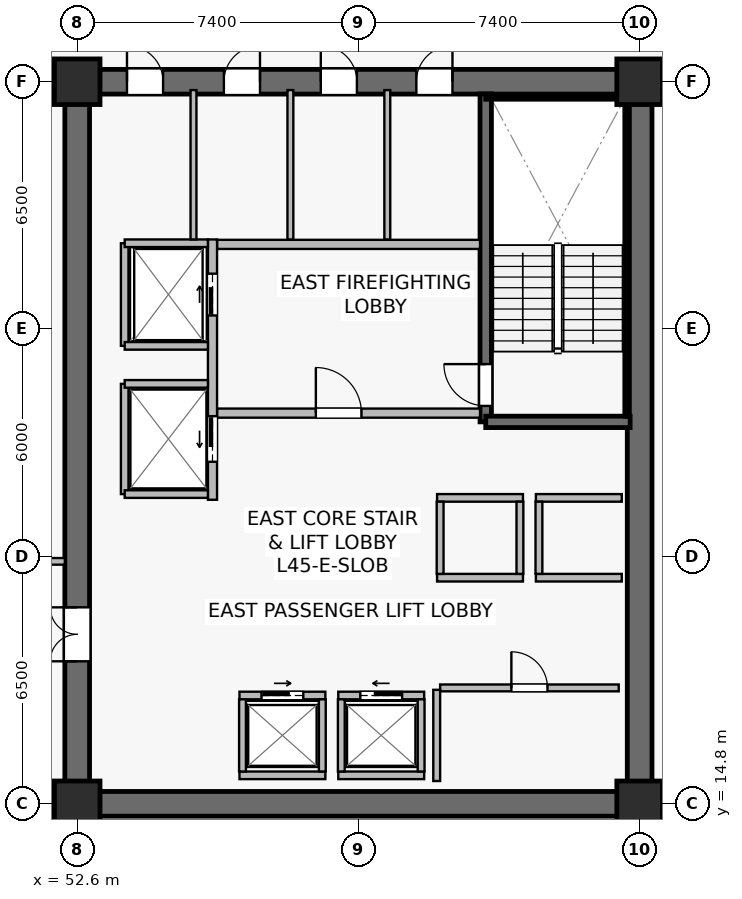
"""IFC4 building model, lengths in metres.
Left out: names, types, materials, properties, quantities, classifications, styles, units other than length and angle.
Written with IfcOpenShell. Run it as: python <this file> out.ifc"""

import sys

from ifc_helpers import new_model, si_unit, direction, frame, frame_2d, origin, origin_2d, place, context, subcontext, project, spatial, rectangle, extrude, source, transform, mapped, element, fill, save


model = new_model("IFC4")
c1 = context("Model", 3, precision=1e-05, world=origin(), true_north=direction((0.0, 1.0)))
c2 = subcontext(c1, "Body", "Model", "MODEL_VIEW")
j1 = project(units=[si_unit("LENGTHUNIT", "METRE"), si_unit("PLANEANGLEUNIT", "RADIAN")], contexts=[c1])
p1 = place(None, origin())
s1 = spatial("IfcSite", under=j1, at=p1, CompositionType="ELEMENT")
p2 = place(p1, origin())
s2 = spatial("IfcBuilding", under=s1, at=p2, CompositionType="ELEMENT")
p3 = place(p2, frame((0.0, 0.0, 187.1)))
s3 = spatial("IfcBuildingStorey", under=s2, at=p3, CompositionType="ELEMENT", Elevation=187.1)
p4 = place(p3, frame((52.275, 14.8, 0.0), z_axis=(0.0, 0.0, 1.0), x_axis=(1.0, 0.0, 0.0)))
e1 = element("IfcWall", 1, at=p4, inside=s3, PredefinedType="SHEAR", context=c2, shape_type="SweptSolid", body=[
    extrude(rectangle(XDim=15.45, YDim=0.65, at=frame_2d((7.725, 0.0))), origin(), (0.0, 0.0, 1.0), 3.79),
])
p5 = place(p3, frame((52.275, 33.8, 0.0), z_axis=(0.0, 0.0, 1.0), x_axis=(1.0, 0.0, 0.0)))
e2 = element("IfcWall", 2, at=p5, inside=s3, PredefinedType="SHEAR", context=c2, shape_type="SweptSolid", body=[
    extrude(rectangle(XDim=15.45, YDim=0.65, at=frame_2d((7.725, 0.0))), origin(), (0.0, 0.0, 1.0), 3.79),
])
p6 = place(p5, frame((9.25, 0.0, 0.0)))
e3 = element("IfcOpeningElement", 3, at=p6, cuts=e2, PredefinedType="OPENING", context=c2, shape_type="SweptSolid", body=[
    extrude(rectangle(XDim=0.95, YDim=2.15, at=frame_2d((0.475, 1.075))), frame((0.0, 0.335, 0.0), z_axis=(0.0, -1.0, 0.0), x_axis=(1.0, 0.0, 0.0)), (0.0, 0.0, 1.0), 0.67),
])
p7 = place(p5, frame((6.735, 0.0, 0.0)))
e4 = element("IfcOpeningElement", 4, at=p7, cuts=e2, PredefinedType="OPENING", context=c2, shape_type="SweptSolid", body=[
    extrude(rectangle(XDim=0.95, YDim=2.15, at=frame_2d((0.475, 1.075))), frame((0.0, 0.335, 0.0), z_axis=(0.0, -1.0, 0.0), x_axis=(1.0, 0.0, 0.0)), (0.0, 0.0, 1.0), 0.67),
])
p8 = place(p5, frame((4.185, 0.0, 0.0)))
e5 = element("IfcOpeningElement", 5, at=p8, cuts=e2, PredefinedType="OPENING", context=c2, shape_type="SweptSolid", body=[
    extrude(rectangle(XDim=0.95, YDim=2.15, at=frame_2d((0.475, 1.075))), frame((0.0, 0.335, 0.0), z_axis=(0.0, -1.0, 0.0), x_axis=(1.0, 0.0, 0.0)), (0.0, 0.0, 1.0), 0.67),
])
p9 = place(p5, frame((1.635, 0.0, 0.0)))
e6 = element("IfcOpeningElement", 6, at=p9, cuts=e2, PredefinedType="OPENING", context=c2, shape_type="SweptSolid", body=[
    extrude(rectangle(XDim=0.95, YDim=2.15, at=frame_2d((0.475, 1.075))), frame((0.0, 0.335, 0.0), z_axis=(0.0, -1.0, 0.0), x_axis=(1.0, 0.0, 0.0)), (0.0, 0.0, 1.0), 0.67),
])
p10 = place(p3, frame((52.6, 15.125, 0.0), z_axis=(0.0, 0.0, 1.0), x_axis=(0.0, 1.0, 0.0)))
e7 = element("IfcWall", 7, at=p10, inside=s3, PredefinedType="SHEAR", context=c2, shape_type="SweptSolid", body=[
    extrude(rectangle(XDim=18.35, YDim=0.65, at=frame_2d((9.175, 0.0))), origin(), (0.0, 0.0, 1.0), 3.79),
])
p11 = place(p10, frame((3.425, 0.0, 0.0)))
e8 = element("IfcOpeningElement", 8, at=p11, cuts=e7, PredefinedType="OPENING", context=c2, shape_type="SweptSolid", body=[
    extrude(rectangle(XDim=1.42, YDim=2.2, at=frame_2d((0.71, 1.1))), frame((0.0, 0.335, 0.0), z_axis=(0.0, -1.0, 0.0), x_axis=(1.0, 0.0, 0.0)), (0.0, 0.0, 1.0), 0.67),
])
p12 = place(p3, frame((67.4, 15.125, 0.0), z_axis=(0.0, 0.0, 1.0), x_axis=(0.0, 1.0, 0.0)))
e9 = element("IfcWall", 9, at=p12, inside=s3, PredefinedType="SHEAR", context=c2, shape_type="SweptSolid", body=[
    extrude(rectangle(XDim=18.35, YDim=0.65, at=frame_2d((9.175, 0.0))), origin(), (0.0, 0.0, 1.0), 3.79),
])
p13 = place(p3, frame((63.35, 24.85, 0.0), z_axis=(0.0, 0.0, 1.0), x_axis=(0.0, 1.0, 0.0)))
e10 = element("IfcWall", 10, at=p13, inside=s3, PredefinedType="SHEAR", context=c2, shape_type="SweptSolid", body=[
    extrude(rectangle(XDim=8.63, YDim=0.3, at=frame_2d((4.315, 0.0))), origin(), (0.0, 0.0, 1.0), 3.79),
])
p14 = place(p13, frame((0.42, 0.0, 0.0)))
e11 = element("IfcOpeningElement", 11, at=p14, cuts=e10, PredefinedType="OPENING", context=c2, shape_type="SweptSolid", body=[
    extrude(rectangle(XDim=1.1, YDim=2.15, at=frame_2d((0.55, 1.075))), frame((0.0, 0.16, 0.0), z_axis=(0.0, -1.0, 0.0), x_axis=(1.0, 0.0, 0.0)), (0.0, 0.0, 1.0), 0.32),
])
p15 = place(p3, frame((63.35, 24.85, 0.0), z_axis=(0.0, 0.0, 1.0), x_axis=(1.0, 0.0, 0.0)))
e12 = element("IfcWall", 12, at=p15, inside=s3, PredefinedType="SHEAR", context=c2, shape_type="SweptSolid", body=[
    extrude(rectangle(XDim=3.8, YDim=0.3, at=frame_2d((1.9, 0.0))), origin(), (0.0, 0.0, 1.0), 3.79),
])
p16 = place(p3, frame((63.35, 33.4, 0.0), z_axis=(0.0, 0.0, 1.0), x_axis=(1.0, 0.0, 0.0)))
e13 = element("IfcWall", 13, at=p16, inside=s3, PredefinedType="SOLIDWALL", context=c2, shape_type="SweptSolid", body=[
    extrude(rectangle(XDim=3.72, YDim=0.12, at=frame_2d((1.86, 0.0))), origin(), (0.0, 0.0, 1.0), 3.79),
])
p17 = place(p3, frame((67.07, 25.0, 0.0), z_axis=(0.0, 0.0, 1.0), x_axis=(0.0, 1.0, 0.0)))
e14 = element("IfcWall", 14, at=p17, inside=s3, PredefinedType="SOLIDWALL", context=c2, shape_type="SweptSolid", body=[
    extrude(rectangle(XDim=8.32, YDim=0.12, at=frame_2d((4.16, 0.0))), origin(), (0.0, 0.0, 1.0), 3.79),
])
m1 = source(origin(), c2, "Body", "SweptSolid", [
    extrude(rectangle(XDim=1.2, YDim=1.2, at=origin_2d()), origin(), (0.0, 0.0, 1.0), 4.1),
])
for number, where, z_axis, x_axis in (
    (15, (52.6, 14.8, 0.0), (0.0, 0.0, 1.0), (1.0, 0.0, 0.0)),
    (16, (67.4, 14.8, 0.0), (0.0, 0.0, 1.0), (1.0, 0.0, 0.0)),
    (17, (52.6, 33.8, 0.0), (0.0, 0.0, 1.0), (1.0, 0.0, 0.0)),
    (18, (67.4, 33.8, 0.0), (0.0, 0.0, 1.0), (1.0, 0.0, 0.0)),
):
    element("IfcColumn", number, at=place(p3, frame(where, z_axis=z_axis, x_axis=x_axis)), inside=s3, PredefinedType="COLUMN", context=c2, shape_type="MappedRepresentation", body=[
        mapped(m1, transform((0.0, 0.0, 0.0), scale=1.0)),
    ])
p18 = place(p3, frame((56.28, 25.08, 0.0), z_axis=(0.0, 0.0, 1.0), x_axis=(1.0, 0.0, 0.0)))
e19 = element("IfcWall", 19, at=p18, inside=s3, PredefinedType="SOLIDWALL", context=c2, shape_type="SweptSolid", body=[
    extrude(rectangle(XDim=6.92, YDim=0.24, at=frame_2d((3.46, 0.0))), origin(), (0.0, 0.0, 1.0), 3.187),
])
p19 = place(p18, frame((2.6, 0.0, 0.0)))
e20 = element("IfcOpeningElement", 20, at=p19, cuts=e19, PredefinedType="OPENING", context=c2, shape_type="SweptSolid", body=[
    extrude(rectangle(XDim=1.2, YDim=2.16, at=frame_2d((0.6, 1.08))), frame((0.0, 0.13, 0.0), z_axis=(0.0, -1.0, 0.0), x_axis=(1.0, 0.0, 0.0)), (0.0, 0.0, 1.0), 0.26),
])
p20 = place(p3, frame((56.28, 29.52, 0.0), z_axis=(0.0, 0.0, 1.0), x_axis=(1.0, 0.0, 0.0)))
e21 = element("IfcWall", 21, at=p20, inside=s3, PredefinedType="SOLIDWALL", context=c2, shape_type="SweptSolid", body=[
    extrude(rectangle(XDim=6.92, YDim=0.24, at=frame_2d((3.46, 0.0))), origin(), (0.0, 0.0, 1.0), 3.187),
])
p21 = place(p3, frame((56.16, 22.8, 0.0), z_axis=(0.0, 0.0, 1.0), x_axis=(0.0, 1.0, 0.0)))
e22 = element("IfcWall", 22, at=p21, inside=s3, PredefinedType="SOLIDWALL", context=c2, shape_type="SweptSolid", body=[
    extrude(rectangle(XDim=6.85, YDim=0.24, at=frame_2d((3.425, 0.0))), origin(), (0.0, 0.0, 1.0), 2.925),
])
p22 = place(p21, frame((4.85, 0.0, 0.0)))
e23 = element("IfcOpeningElement", 23, at=p22, cuts=e22, PredefinedType="OPENING", context=c2, shape_type="SweptSolid", body=[
    extrude(rectangle(XDim=1.1, YDim=2.22, at=frame_2d((0.55, 1.11))), frame((0.0, 0.13, 0.0), z_axis=(0.0, -1.0, 0.0), x_axis=(1.0, 0.0, 0.0)), (0.0, 0.0, 1.0), 0.26),
])
p23 = place(p21, frame((1.0, 0.0, 0.0)))
e24 = element("IfcOpeningElement", 24, at=p23, cuts=e22, PredefinedType="OPENING", context=c2, shape_type="SweptSolid", body=[
    extrude(rectangle(XDim=1.2, YDim=2.22, at=frame_2d((0.6, 1.11))), frame((0.0, 0.13, 0.0), z_axis=(0.0, -1.0, 0.0), x_axis=(1.0, 0.0, 0.0)), (0.0, 0.0, 1.0), 0.26),
])
p24 = place(p3, frame((59.47, 17.65, 0.0), z_axis=(0.0, 0.0, 1.0), x_axis=(1.0, 0.0, 0.0)))
e25 = element("IfcWall", 25, at=p24, inside=s3, PredefinedType="SOLIDWALL", context=c2, shape_type="SweptSolid", body=[
    extrude(rectangle(XDim=2.26, YDim=0.2, at=frame_2d((1.13, 0.0))), origin(), (0.0, 0.0, 1.0), 3.187),
])
p25 = place(p24, frame((0.58, 0.0, 0.0)))
e26 = element("IfcOpeningElement", 26, at=p25, cuts=e25, PredefinedType="OPENING", context=c2, shape_type="SweptSolid", body=[
    extrude(rectangle(XDim=1.1, YDim=2.22, at=frame_2d((0.55, 1.11))), frame((0.0, 0.11, 0.0), z_axis=(0.0, -1.0, 0.0), x_axis=(1.0, 0.0, 0.0)), (0.0, 0.0, 1.0), 0.22),
])
p26 = place(p3, frame((59.47, 15.55, 0.0), z_axis=(0.0, 0.0, 1.0), x_axis=(1.0, 0.0, 0.0)))
e27 = element("IfcWall", 27, at=p26, inside=s3, PredefinedType="SOLIDWALL", context=c2, shape_type="SweptSolid", body=[
    extrude(rectangle(XDim=2.26, YDim=0.2, at=frame_2d((1.13, 0.0))), origin(), (0.0, 0.0, 1.0), 3.187),
])
for number, where, z_axis, x_axis in (
    (28, (59.55, 15.65, 0.0), (0.0, 0.0, 1.0), (0.0, 1.0, 0.0)),
    (29, (61.65, 15.65, 0.0), (0.0, 0.0, 1.0), (0.0, 1.0, 0.0)),
):
    element("IfcWall", number, at=place(p3, frame(where, z_axis=z_axis, x_axis=x_axis)), inside=s3, PredefinedType="SOLIDWALL", context=c2, shape_type="SweptSolid", body=[
        extrude(rectangle(XDim=1.9, YDim=0.18, at=frame_2d((0.95, 0.0))), origin(), (0.0, 0.0, 1.0), 3.79),
    ])
p27 = place(p3, frame((56.87, 17.65, 0.0), z_axis=(0.0, 0.0, 1.0), x_axis=(1.0, 0.0, 0.0)))
e30 = element("IfcWall", 30, at=p27, inside=s3, PredefinedType="SOLIDWALL", context=c2, shape_type="SweptSolid", body=[
    extrude(rectangle(XDim=2.26, YDim=0.2, at=frame_2d((1.13, 0.0))), origin(), (0.0, 0.0, 1.0), 3.79),
])
p28 = place(p27, frame((0.58, 0.0, 0.0)))
e31 = element("IfcOpeningElement", 31, at=p28, cuts=e30, PredefinedType="OPENING", context=c2, shape_type="SweptSolid", body=[
    extrude(rectangle(XDim=1.1, YDim=2.22, at=frame_2d((0.55, 1.11))), frame((0.0, 0.11, 0.0), z_axis=(0.0, -1.0, 0.0), x_axis=(1.0, 0.0, 0.0)), (0.0, 0.0, 1.0), 0.22),
])
p29 = place(p3, frame((56.87, 15.55, 0.0), z_axis=(0.0, 0.0, 1.0), x_axis=(1.0, 0.0, 0.0)))
e32 = element("IfcWall", 32, at=p29, inside=s3, PredefinedType="SOLIDWALL", context=c2, shape_type="SweptSolid", body=[
    extrude(rectangle(XDim=2.26, YDim=0.2, at=frame_2d((1.13, 0.0))), origin(), (0.0, 0.0, 1.0), 3.79),
])
for number, where, z_axis, x_axis in (
    (33, (56.95, 15.65, 0.0), (0.0, 0.0, 1.0), (0.0, 1.0, 0.0)),
    (34, (59.05, 15.65, 0.0), (0.0, 0.0, 1.0), (0.0, 1.0, 0.0)),
):
    element("IfcWall", number, at=place(p3, frame(where, z_axis=z_axis, x_axis=x_axis)), inside=s3, PredefinedType="SOLIDWALL", context=c2, shape_type="SweptSolid", body=[
        extrude(rectangle(XDim=1.9, YDim=0.18, at=frame_2d((0.95, 0.0))), origin(), (0.0, 0.0, 1.0), 3.79),
    ])
for number, where, z_axis, x_axis in (
    (35, (64.67, 20.75, 0.0), (0.0, 0.0, 1.0), (1.0, 0.0, 0.0)),
    (36, (64.67, 22.85, 0.0), (0.0, 0.0, 1.0), (1.0, 0.0, 0.0)),
):
    element("IfcWall", number, at=place(p3, frame(where, z_axis=z_axis, x_axis=x_axis)), inside=s3, PredefinedType="SOLIDWALL", context=c2, shape_type="SweptSolid", body=[
        extrude(rectangle(XDim=2.26, YDim=0.2, at=frame_2d((1.13, 0.0))), origin(), (0.0, 0.0, 1.0), 3.79),
    ])
p30 = place(p3, frame((64.75, 20.85, 0.0), z_axis=(0.0, 0.0, 1.0), x_axis=(0.0, 1.0, 0.0)))
e37 = element("IfcWall", 37, at=p30, inside=s3, PredefinedType="SOLIDWALL", context=c2, shape_type="SweptSolid", body=[
    extrude(rectangle(XDim=1.9, YDim=0.18, at=frame_2d((0.95, 0.0))), origin(), (0.0, 0.0, 1.0), 3.79),
])
for number, where, z_axis, x_axis in (
    (38, (62.07, 20.75, 0.0), (0.0, 0.0, 1.0), (1.0, 0.0, 0.0)),
    (39, (62.07, 22.85, 0.0), (0.0, 0.0, 1.0), (1.0, 0.0, 0.0)),
):
    element("IfcWall", number, at=place(p3, frame(where, z_axis=z_axis, x_axis=x_axis)), inside=s3, PredefinedType="SOLIDWALL", context=c2, shape_type="SweptSolid", body=[
        extrude(rectangle(XDim=2.26, YDim=0.2, at=frame_2d((1.13, 0.0))), origin(), (0.0, 0.0, 1.0), 3.79),
    ])
for number, where, z_axis, x_axis in (
    (40, (62.15, 20.85, 0.0), (0.0, 0.0, 1.0), (0.0, 1.0, 0.0)),
    (41, (64.25, 20.85, 0.0), (0.0, 0.0, 1.0), (0.0, 1.0, 0.0)),
):
    element("IfcWall", number, at=place(p3, frame(where, z_axis=z_axis, x_axis=x_axis)), inside=s3, PredefinedType="SOLIDWALL", context=c2, shape_type="SweptSolid", body=[
        extrude(rectangle(XDim=1.9, YDim=0.18, at=frame_2d((0.95, 0.0))), origin(), (0.0, 0.0, 1.0), 3.79),
    ])
p31 = place(p3, frame((53.85, 26.85, 0.0), z_axis=(0.0, 0.0, 1.0), x_axis=(0.0, 1.0, 0.0)))
e42 = element("IfcWall", 42, at=p31, inside=s3, PredefinedType="SOLIDWALL", context=c2, shape_type="SweptSolid", body=[
    extrude(rectangle(XDim=2.7, YDim=0.2, at=frame_2d((1.35, 0.0))), origin(), (0.0, 0.0, 1.0), 3.79),
])
p32 = place(p3, frame((53.85, 29.55, 0.0), z_axis=(0.0, 0.0, 1.0), x_axis=(1.0, 0.0, 0.0)))
e43 = element("IfcWall", 43, at=p32, inside=s3, PredefinedType="SOLIDWALL", context=c2, shape_type="SweptSolid", body=[
    extrude(rectangle(XDim=2.19, YDim=0.2, at=frame_2d((1.095, 0.0))), origin(), (0.0, 0.0, 1.0), 3.79),
])
p33 = place(p3, frame((53.85, 26.85, 0.0), z_axis=(0.0, 0.0, 1.0), x_axis=(1.0, 0.0, 0.0)))
e44 = element("IfcWall", 44, at=p33, inside=s3, PredefinedType="SOLIDWALL", context=c2, shape_type="SweptSolid", body=[
    extrude(rectangle(XDim=2.19, YDim=0.2, at=frame_2d((1.095, 0.0))), origin(), (0.0, 0.0, 1.0), 3.187),
])
p34 = place(p3, frame((53.85, 22.95, 0.0), z_axis=(0.0, 0.0, 1.0), x_axis=(0.0, 1.0, 0.0)))
e45 = element("IfcWall", 45, at=p34, inside=s3, PredefinedType="SOLIDWALL", context=c2, shape_type="SweptSolid", body=[
    extrude(rectangle(XDim=2.9, YDim=0.2, at=frame_2d((1.45, 0.0))), origin(), (0.0, 0.0, 1.0), 2.925),
])
for number, where, z_axis, x_axis in (
    (46, (53.85, 25.85, 0.0), (0.0, 0.0, 1.0), (1.0, 0.0, 0.0)),
    (47, (53.85, 22.95, 0.0), (0.0, 0.0, 1.0), (1.0, 0.0, 0.0)),
):
    element("IfcWall", number, at=place(p3, frame(where, z_axis=z_axis, x_axis=x_axis)), inside=s3, PredefinedType="SOLIDWALL", context=c2, shape_type="SweptSolid", body=[
        extrude(rectangle(XDim=2.19, YDim=0.2, at=frame_2d((1.095, 0.0))), origin(), (0.0, 0.0, 1.0), 3.79),
    ])
p35 = place(p3, frame((62.15, 17.85, 0.0), z_axis=(0.0, 0.0, 1.0), x_axis=(1.0, 0.0, 0.0)))
e48 = element("IfcWall", 48, at=p35, inside=s3, PredefinedType="SOLIDWALL", context=c2, shape_type="SweptSolid", body=[
    extrude(rectangle(XDim=4.7, YDim=0.18, at=frame_2d((2.35, 0.0))), origin(), (0.0, 0.0, 1.0), 3.79),
])
p36 = place(p35, frame((1.875, 0.0, 0.0)))
e49 = element("IfcOpeningElement", 49, at=p36, cuts=e48, PredefinedType="OPENING", context=c2, shape_type="SweptSolid", body=[
    extrude(rectangle(XDim=0.95, YDim=2.15, at=frame_2d((0.475, 1.075))), frame((0.0, 0.1, 0.0), z_axis=(0.0, -1.0, 0.0), x_axis=(1.0, 0.0, 0.0)), (0.0, 0.0, 1.0), 0.2),
])
p37 = place(p3, frame((62.06, 15.4, 0.0), z_axis=(0.0, 0.0, 1.0), x_axis=(0.0, 1.0, 0.0)))
e50 = element("IfcWall", 50, at=p37, inside=s3, PredefinedType="SOLIDWALL", context=c2, shape_type="SweptSolid", body=[
    extrude(rectangle(XDim=2.4, YDim=0.18, at=frame_2d((1.2, 0.0))), origin(), (0.0, 0.0, 1.0), 3.79),
])
for number, where, z_axis, x_axis in (
    (51, (60.76, 29.65, 0.0), (0.0, 0.0, 1.0), (0.0, 1.0, 0.0)),
    (52, (58.21, 29.65, 0.0), (0.0, 0.0, 1.0), (0.0, 1.0, 0.0)),
    (53, (55.66, 29.65, 0.0), (0.0, 0.0, 1.0), (0.0, 1.0, 0.0)),
):
    element("IfcWall", number, at=place(p3, frame(where, z_axis=z_axis, x_axis=x_axis)), inside=s3, PredefinedType="PLUMBINGWALL", context=c2, shape_type="SweptSolid", body=[
        extrude(rectangle(XDim=3.93, YDim=0.155, at=frame_2d((1.965, 0.0))), origin(), (0.0, 0.0, 1.0), 3.79),
    ])
p38 = place(p3, frame((48.3, 34.26, 0.0), z_axis=(0.0, 0.0, 1.0), x_axis=(1.0, 0.0, 0.0)))
e54 = element("IfcWall", 54, at=p38, inside=s3, PredefinedType="PARTITIONING", context=c2, shape_type="SweptSolid", body=[
    extrude(rectangle(XDim=3.975, YDim=0.175, at=frame_2d((1.987, 0.0))), origin(), (0.0, 0.0, 1.0), 3.475),
])
p39 = place(p3, frame((48.3, 21.18, 0.0), z_axis=(0.0, 0.0, 1.0), x_axis=(1.0, 0.0, 0.0)))
e55 = element("IfcWall", 55, at=p39, inside=s3, PredefinedType="PARTITIONING", context=c2, shape_type="SweptSolid", body=[
    extrude(rectangle(XDim=3.975, YDim=0.175, at=frame_2d((1.987, 0.0))), origin(), (0.0, 0.0, 1.0), 3.79),
])
p40 = place(p39, frame((1.35, 0.0, 0.0)))
e56 = element("IfcOpeningElement", 56, at=p40, cuts=e55, PredefinedType="OPENING", context=c2, shape_type="SweptSolid", body=[
    extrude(rectangle(XDim=0.95, YDim=2.15, at=frame_2d((0.475, 1.075))), frame((0.0, 0.098, 0.0), z_axis=(0.0, -1.0, 0.0), x_axis=(1.0, 0.0, 0.0)), (0.0, 0.0, 1.0), 0.195),
])
m2 = source(origin(), c2, "Body", "SweptSolid", [
    extrude(rectangle(XDim=1.1, YDim=2.15, at=frame_2d((0.55, 1.075))), frame((0.0, 0.025, 0.0), z_axis=(0.0, -1.0, 0.0), x_axis=(1.0, 0.0, 0.0)), (0.0, 0.0, 1.0), 0.05),
])
p41 = place(p14, origin())
e57 = element("IfcDoor", 57, at=p41, inside=s3, OperationType="SINGLE_SWING_RIGHT", PredefinedType="DOOR", context=c2, shape_type="MappedRepresentation", body=[
    mapped(m2, transform((0.0, 0.0, 0.0), scale=1.0)),
])
fill(e11, e57)
m3 = source(origin(), c2, "Body", "SweptSolid", [
    extrude(rectangle(XDim=1.2, YDim=2.16, at=frame_2d((0.6, 1.08))), frame((0.0, 0.025, 0.0), z_axis=(0.0, -1.0, 0.0), x_axis=(1.0, 0.0, 0.0)), (0.0, 0.0, 1.0), 0.05),
])
p42 = place(p19, origin())
e58 = element("IfcDoor", 58, at=p42, inside=s3, OperationType="SINGLE_SWING_LEFT", PredefinedType="DOOR", context=c2, shape_type="MappedRepresentation", body=[
    mapped(m3, transform((0.0, 0.0, 0.0), scale=1.0)),
])
fill(e20, e58)
m4 = source(origin(), c2, "Body", "SweptSolid", [
    extrude(rectangle(XDim=1.1, YDim=2.22, at=frame_2d((0.55, 1.11))), frame((0.0, 0.025, 0.0), z_axis=(0.0, -1.0, 0.0), x_axis=(1.0, 0.0, 0.0)), (0.0, 0.0, 1.0), 0.05),
])
p43 = place(p25, origin())
e59 = element("IfcDoor", 59, at=p43, inside=s3, OperationType="SLIDING_TO_LEFT", PredefinedType="USERDEFINED", context=c2, shape_type="MappedRepresentation", body=[
    mapped(m4, transform((0.0, 0.0, 0.0), scale=1.0)),
])
fill(e26, e59)
p44 = place(p28, origin())
e60 = element("IfcDoor", 60, at=p44, inside=s3, OperationType="SLIDING_TO_RIGHT", PredefinedType="USERDEFINED", context=c2, shape_type="MappedRepresentation", body=[
    mapped(m4, transform((0.0, 0.0, 0.0), scale=1.0)),
])
fill(e31, e60)
p45 = place(p22, origin())
e61 = element("IfcDoor", 61, at=p45, inside=s3, OperationType="SLIDING_TO_RIGHT", PredefinedType="USERDEFINED", context=c2, shape_type="MappedRepresentation", body=[
    mapped(m4, transform((0.0, 0.0, 0.0), scale=1.0)),
])
fill(e23, e61)
m5 = source(origin(), c2, "Body", "SweptSolid", [
    extrude(rectangle(XDim=1.2, YDim=2.22, at=frame_2d((0.6, 1.11))), frame((0.0, 0.025, 0.0), z_axis=(0.0, -1.0, 0.0), x_axis=(1.0, 0.0, 0.0)), (0.0, 0.0, 1.0), 0.05),
])
p46 = place(p23, origin())
e62 = element("IfcDoor", 62, at=p46, inside=s3, OperationType="SLIDING_TO_LEFT", PredefinedType="USERDEFINED", context=c2, shape_type="MappedRepresentation", body=[
    mapped(m5, transform((0.0, 0.0, 0.0), scale=1.0)),
])
fill(e24, e62)
m6 = source(origin(), c2, "Body", "SweptSolid", [
    extrude(rectangle(XDim=0.95, YDim=2.15, at=frame_2d((0.475, 1.075))), frame((0.0, 0.025, 0.0), z_axis=(0.0, -1.0, 0.0), x_axis=(1.0, 0.0, 0.0)), (0.0, 0.0, 1.0), 0.05),
])
p47 = place(p36, origin())
e63 = element("IfcDoor", 63, at=p47, inside=s3, OperationType="SINGLE_SWING_LEFT", PredefinedType="DOOR", context=c2, shape_type="MappedRepresentation", body=[
    mapped(m6, transform((0.0, 0.0, 0.0), scale=1.0)),
])
fill(e49, e63)
m7 = source(origin(), c2, "Body", "SweptSolid", [
    extrude(rectangle(XDim=1.42, YDim=2.2, at=frame_2d((0.71, 1.1))), frame((0.0, 0.025, 0.0), z_axis=(0.0, -1.0, 0.0), x_axis=(1.0, 0.0, 0.0)), (0.0, 0.0, 1.0), 0.05),
])
p48 = place(p11, origin())
e64 = element("IfcDoor", 64, at=p48, inside=s3, OperationType="DOUBLE_DOOR_SINGLE_SWING", PredefinedType="DOOR", context=c2, shape_type="MappedRepresentation", body=[
    mapped(m7, transform((0.0, 0.0, 0.0), scale=1.0)),
])
fill(e8, e64)
p49 = place(p6, origin())
e65 = element("IfcDoor", 65, at=p49, inside=s3, OperationType="SINGLE_SWING_RIGHT", PredefinedType="DOOR", context=c2, shape_type="MappedRepresentation", body=[
    mapped(m6, transform((0.0, 0.0, 0.0), scale=1.0)),
])
fill(e3, e65)
p50 = place(p7, origin())
e66 = element("IfcDoor", 66, at=p50, inside=s3, OperationType="SINGLE_SWING_LEFT", PredefinedType="DOOR", context=c2, shape_type="MappedRepresentation", body=[
    mapped(m6, transform((0.0, 0.0, 0.0), scale=1.0)),
])
fill(e4, e66)
p51 = place(p8, origin())
e67 = element("IfcDoor", 67, at=p51, inside=s3, OperationType="SINGLE_SWING_RIGHT", PredefinedType="DOOR", context=c2, shape_type="MappedRepresentation", body=[
    mapped(m6, transform((0.0, 0.0, 0.0), scale=1.0)),
])
fill(e5, e67)
p52 = place(p9, origin())
e68 = element("IfcDoor", 68, at=p52, inside=s3, OperationType="SINGLE_SWING_LEFT", PredefinedType="DOOR", context=c2, shape_type="MappedRepresentation", body=[
    mapped(m6, transform((0.0, 0.0, 0.0), scale=1.0)),
])
fill(e6, e68)
save(model, sys.argv[1])
